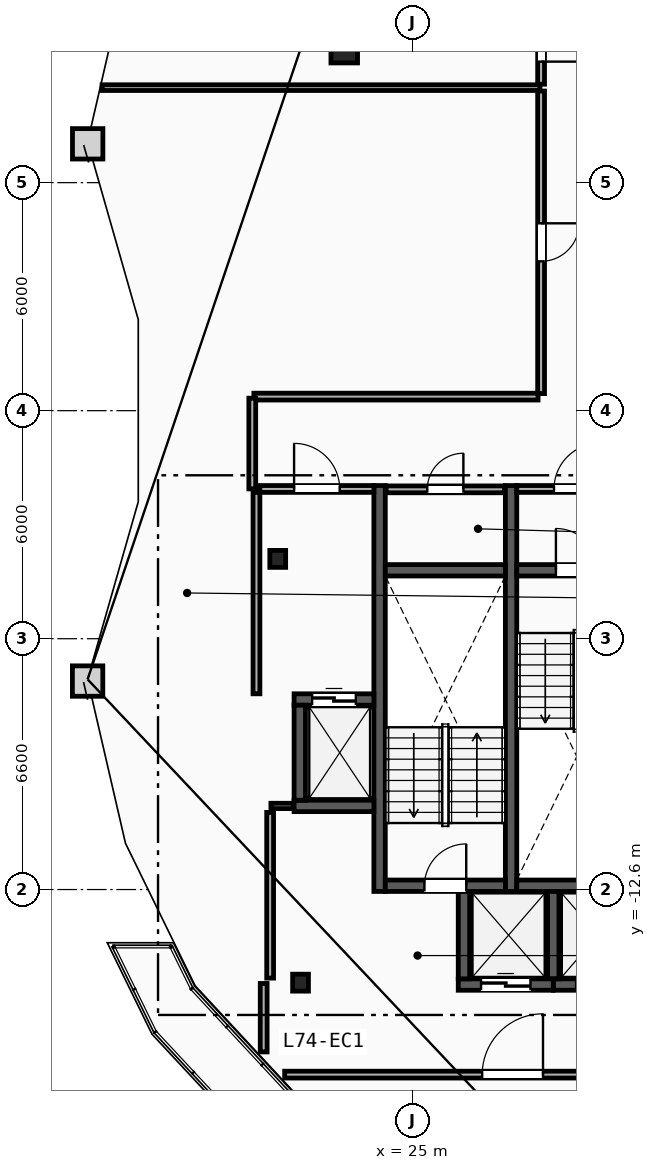
"""IFC4 building model, lengths in metres.
Left out: names, types, materials, properties, quantities, classifications, styles, units other than length and angle.
Written with IfcOpenShell. Run it as: python <this file> out.ifc"""

import sys

from ifc_helpers import new_model, si_unit, direction, frame, frame_2d, origin, origin_2d, place, context, subcontext, project, spatial, rectangle, i_section, extrude, element, fill, save


model = new_model("IFC4")
c1 = context("Model", 3, precision=1e-05, world=origin(), true_north=direction((0.0, 1.0)))
c2 = subcontext(c1, "Body", "Model", "MODEL_VIEW")
j1 = project(units=[si_unit("LENGTHUNIT", "METRE"), si_unit("PLANEANGLEUNIT", "RADIAN")], contexts=[c1])
p1 = place(None, origin())
s1 = spatial("IfcSite", under=j1, at=p1, CompositionType="ELEMENT")
p2 = place(p1, origin())
s2 = spatial("IfcBuilding", under=s1, at=p2, CompositionType="ELEMENT")
p3 = place(p2, frame((0.0, 0.0, 279.2)))
s3 = spatial("IfcBuildingStorey", under=s2, at=p3, CompositionType="ELEMENT", Elevation=279.2)
for number, where, z_axis, x_axis in (
    (1, (21.45, -3.9, 0.0), (0.0, 0.0, 1.0), (1.0, 0.0, 0.0)),
    (2, (22.05, -15.05, 0.0), (0.0, 0.0, 1.0), (1.0, 0.0, 0.0)),
):
    element("IfcColumn", number, at=place(p3, frame(where, z_axis=z_axis, x_axis=x_axis)), inside=s3, PredefinedType="COLUMN", context=c2, shape_type="SweptSolid", body=[
        extrude(i_section(OverallWidth=0.416, OverallDepth=0.446, WebThickness=0.039, FlangeThickness=0.063, FilletRadius=0.018, at=origin_2d()), origin(), (0.0, 0.0, 1.0), 3.6),
    ])
p4 = place(p3, frame((23.2, 9.5, 0.0), z_axis=(0.0, 0.0, 1.0), x_axis=(1.0, 0.0, 0.0)))
e3 = element("IfcColumn", 3, at=p4, inside=s3, PredefinedType="COLUMN", context=c2, shape_type="SweptSolid", body=[
    extrude(rectangle(XDim=0.7, YDim=0.7, at=origin_2d()), origin(), (0.0, 0.0, 1.0), 3.6),
])
for number, where, z_axis, x_axis in (
    (4, (27.59, -12.65, 0.0), (0.0, 0.0, 1.0), (0.0, 1.0, 0.0)),
    (5, (24.13, -12.65, 0.0), (0.0, 0.0, 1.0), (0.0, 1.0, 0.0)),
):
    element("IfcWall", number, at=place(p3, frame(where, z_axis=z_axis, x_axis=x_axis)), inside=s3, PredefinedType="SHEAR", context=c2, shape_type="SweptSolid", body=[
        extrude(rectangle(XDim=10.68, YDim=0.3, at=frame_2d((5.34, 0.0))), origin(), (0.0, 0.0, 1.0), 3.34),
    ])
p5 = place(p3, frame((27.74, -4.2, 0.0), z_axis=(0.0, 0.0, 1.0), x_axis=(1.0, 0.0, 0.0)))
e6 = element("IfcWall", 6, at=p5, inside=s3, PredefinedType="SHEAR", context=c2, shape_type="SweptSolid", body=[
    extrude(rectangle(XDim=3.16, YDim=0.3, at=frame_2d((1.58, 0.0))), origin(), (0.0, 0.0, 1.0), 3.34),
])
p6 = place(p5, frame((1.03, 0.0, 0.0)))
e7 = element("IfcOpeningElement", 7, at=p6, cuts=e6, PredefinedType="OPENING", context=c2, shape_type="SweptSolid", body=[
    extrude(rectangle(XDim=1.1, YDim=2.15, at=frame_2d((0.55, 1.075))), frame((0.0, 0.16, 0.0), z_axis=(0.0, -1.0, 0.0), x_axis=(1.0, 0.0, 0.0)), (0.0, 0.0, 1.0), 0.32),
])
p7 = place(p3, frame((27.74, -12.5, 0.0), z_axis=(0.0, 0.0, 1.0), x_axis=(1.0, 0.0, 0.0)))
e8 = element("IfcWall", 8, at=p7, inside=s3, PredefinedType="SHEAR", context=c2, shape_type="SweptSolid", body=[
    extrude(rectangle(XDim=3.16, YDim=0.3, at=frame_2d((1.58, 0.0))), origin(), (0.0, 0.0, 1.0), 3.34),
])
p8 = place(p3, frame((24.28, -12.5, 0.0), z_axis=(0.0, 0.0, 1.0), x_axis=(1.0, 0.0, 0.0)))
e9 = element("IfcWall", 9, at=p8, inside=s3, PredefinedType="SHEAR", context=c2, shape_type="SweptSolid", body=[
    extrude(rectangle(XDim=3.16, YDim=0.3, at=frame_2d((1.58, 0.0))), origin(), (0.0, 0.0, 1.0), 3.34),
])
p9 = place(p8, frame((1.03, 0.0, 0.0)))
e10 = element("IfcOpeningElement", 10, at=p9, cuts=e9, PredefinedType="OPENING", context=c2, shape_type="SweptSolid", body=[
    extrude(rectangle(XDim=1.1, YDim=2.15, at=frame_2d((0.55, 1.075))), frame((0.0, 0.16, 0.0), z_axis=(0.0, -1.0, 0.0), x_axis=(1.0, 0.0, 0.0)), (0.0, 0.0, 1.0), 0.32),
])
p10 = place(p3, frame((24.28, -4.2, 0.0), z_axis=(0.0, 0.0, 1.0), x_axis=(1.0, 0.0, 0.0)))
e11 = element("IfcWall", 11, at=p10, inside=s3, PredefinedType="SHEAR", context=c2, shape_type="SweptSolid", body=[
    extrude(rectangle(XDim=3.16, YDim=0.3, at=frame_2d((1.58, 0.0))), origin(), (0.0, 0.0, 1.0), 3.34),
])
p11 = place(p3, frame((20.89, -7.45, 0.0), z_axis=(0.0, 0.0, 1.0), x_axis=(0.0, 1.0, 0.0)))
e12 = element("IfcWall", 12, at=p11, inside=s3, PredefinedType="PARTITIONING", context=c2, shape_type="SweptSolid", body=[
    extrude(rectangle(XDim=5.3, YDim=0.18, at=frame_2d((2.65, 0.0))), origin(), (0.0, 0.0, 1.0), 3.34),
])
p12 = place(p3, frame((20.98, -2.06, 0.0), z_axis=(0.0, 0.0, 1.0), x_axis=(1.0, 0.0, 0.0)))
e13 = element("IfcWall", 13, at=p12, inside=s3, PredefinedType="PARTITIONING", context=c2, shape_type="SweptSolid", body=[
    extrude(rectangle(XDim=3.0, YDim=0.18, at=frame_2d((1.5, 0.0))), origin(), (0.0, 0.0, 1.0), 3.34),
])
p13 = place(p12, frame((0.9, 0.0, 0.0)))
e14 = element("IfcOpeningElement", 14, at=p13, cuts=e13, PredefinedType="OPENING", context=c2, shape_type="SweptSolid", body=[
    extrude(rectangle(XDim=1.2, YDim=2.15, at=frame_2d((0.6, 1.075))), frame((0.0, 0.1, 0.0), z_axis=(0.0, -1.0, 0.0), x_axis=(1.0, 0.0, 0.0)), (0.0, 0.0, 1.0), 0.2),
])
p14 = place(p3, frame((27.74, -2.06, 0.0), z_axis=(0.0, 0.0, 1.0), x_axis=(1.0, 0.0, 0.0)))
e15 = element("IfcWall", 15, at=p14, inside=s3, PredefinedType="PARTITIONING", context=c2, shape_type="SweptSolid", body=[
    extrude(rectangle(XDim=3.16, YDim=0.18, at=frame_2d((1.58, 0.0))), origin(), (0.0, 0.0, 1.0), 3.34),
])
p15 = place(p14, frame((0.98, 0.0, 0.0)))
e16 = element("IfcOpeningElement", 16, at=p15, cuts=e15, PredefinedType="OPENING", context=c2, shape_type="SweptSolid", body=[
    extrude(rectangle(XDim=1.2, YDim=2.15, at=frame_2d((0.6, 1.075))), frame((0.0, 0.1, 0.0), z_axis=(0.0, -1.0, 0.0), x_axis=(1.0, 0.0, 0.0)), (0.0, 0.0, 1.0), 0.2),
])
p16 = place(p3, frame((21.88, -7.6, 0.0), z_axis=(0.0, 0.0, 1.0), x_axis=(1.0, 0.0, 0.0)))
e17 = element("IfcWall", 17, at=p16, inside=s3, PredefinedType="SHEAR", context=c2, shape_type="SweptSolid", body=[
    extrude(rectangle(XDim=2.1, YDim=0.3, at=frame_2d((1.05, 0.0))), origin(), (0.0, 0.0, 1.0), 3.34),
])
p17 = place(p16, frame((0.475, 0.0, 0.0)))
e18 = element("IfcOpeningElement", 18, at=p17, cuts=e17, PredefinedType="OPENING", context=c2, shape_type="SweptSolid", body=[
    extrude(rectangle(XDim=1.15, YDim=2.2, at=frame_2d((0.575, 1.1))), frame((0.0, 0.16, 0.0), z_axis=(0.0, -1.0, 0.0), x_axis=(1.0, 0.0, 0.0)), (0.0, 0.0, 1.0), 0.32),
])
p18 = place(p3, frame((21.88, -10.4, 0.0), z_axis=(0.0, 0.0, 1.0), x_axis=(1.0, 0.0, 0.0)))
e19 = element("IfcWall", 19, at=p18, inside=s3, PredefinedType="SHEAR", context=c2, shape_type="SweptSolid", body=[
    extrude(rectangle(XDim=2.1, YDim=0.3, at=frame_2d((1.05, 0.0))), origin(), (0.0, 0.0, 1.0), 3.34),
])
p19 = place(p3, frame((22.03, -10.25, 0.0), z_axis=(0.0, 0.0, 1.0), x_axis=(0.0, 1.0, 0.0)))
e20 = element("IfcWall", 20, at=p19, inside=s3, PredefinedType="SHEAR", context=c2, shape_type="SweptSolid", body=[
    extrude(rectangle(XDim=2.5, YDim=0.3, at=frame_2d((1.25, 0.0))), origin(), (0.0, 0.0, 1.0), 3.34),
])
p20 = place(p3, frame((28.7, -15.1, 0.0), z_axis=(0.0, 0.0, 1.0), x_axis=(1.0, 0.0, 0.0)))
e21 = element("IfcWall", 21, at=p20, inside=s3, PredefinedType="SHEAR", context=c2, shape_type="SweptSolid", body=[
    extrude(rectangle(XDim=2.5, YDim=0.3, at=frame_2d((1.25, 0.0))), origin(), (0.0, 0.0, 1.0), 3.34),
])
p21 = place(p20, frame((0.6, 0.0, 0.0)))
e22 = element("IfcOpeningElement", 22, at=p21, cuts=e21, PredefinedType="OPENING", context=c2, shape_type="SweptSolid", body=[
    extrude(rectangle(XDim=1.3, YDim=2.2, at=frame_2d((0.65, 1.1))), frame((0.0, 0.16, 0.0), z_axis=(0.0, -1.0, 0.0), x_axis=(1.0, 0.0, 0.0)), (0.0, 0.0, 1.0), 0.32),
])
p22 = place(p3, frame((28.7, -14.95, 0.0), z_axis=(0.0, 0.0, 1.0), x_axis=(0.0, 1.0, 0.0)))
e23 = element("IfcWall", 23, at=p22, inside=s3, PredefinedType="SHEAR", context=c2, shape_type="SweptSolid", body=[
    extrude(rectangle(XDim=2.3, YDim=0.3, at=frame_2d((1.15, 0.0))), origin(), (0.0, 0.0, 1.0), 3.34),
])
p23 = place(p3, frame((26.2, -15.1, 0.0), z_axis=(0.0, 0.0, 1.0), x_axis=(1.0, 0.0, 0.0)))
e24 = element("IfcWall", 24, at=p23, inside=s3, PredefinedType="SHEAR", context=c2, shape_type="SweptSolid", body=[
    extrude(rectangle(XDim=2.5, YDim=0.3, at=frame_2d((1.25, 0.0))), origin(), (0.0, 0.0, 1.0), 3.34),
])
p24 = place(p23, frame((0.6, 0.0, 0.0)))
e25 = element("IfcOpeningElement", 25, at=p24, cuts=e24, PredefinedType="OPENING", context=c2, shape_type="SweptSolid", body=[
    extrude(rectangle(XDim=1.3, YDim=2.2, at=frame_2d((0.65, 1.1))), frame((0.0, 0.16, 0.0), z_axis=(0.0, -1.0, 0.0), x_axis=(1.0, 0.0, 0.0)), (0.0, 0.0, 1.0), 0.32),
])
p25 = place(p3, frame((26.35, -14.95, 0.0), z_axis=(0.0, 0.0, 1.0), x_axis=(0.0, 1.0, 0.0)))
e26 = element("IfcWall", 26, at=p25, inside=s3, PredefinedType="SHEAR", context=c2, shape_type="SweptSolid", body=[
    extrude(rectangle(XDim=2.3, YDim=0.3, at=frame_2d((1.15, 0.0))), origin(), (0.0, 0.0, 1.0), 3.34),
])
p26 = place(p3, frame((21.27, -10.4, 0.0), z_axis=(0.0, 0.0, 1.0), x_axis=(1.0, 0.0, 0.0)))
e27 = element("IfcWall", 27, at=p26, inside=s3, PredefinedType="PARTITIONING", context=c2, shape_type="SweptSolid", body=[
    extrude(rectangle(XDim=0.59, YDim=0.14, at=frame_2d((0.295, 0.0))), origin(), (0.0, 0.0, 1.0), 3.34),
])
p27 = place(p3, frame((21.25, -14.93, 0.0), z_axis=(0.0, 0.0, 1.0), x_axis=(0.0, 1.0, 0.0)))
e28 = element("IfcWall", 28, at=p27, inside=s3, PredefinedType="PARTITIONING", context=c2, shape_type="SweptSolid", body=[
    extrude(rectangle(XDim=4.36, YDim=0.18, at=frame_2d((2.18, 0.0))), origin(), (0.0, 0.0, 1.0), 3.34),
])
p28 = place(p3, frame((24.3, -2.07, 0.0), z_axis=(0.0, 0.0, 1.0), x_axis=(1.0, 0.0, 0.0)))
e29 = element("IfcWall", 29, at=p28, inside=s3, PredefinedType="PARTITIONING", context=c2, shape_type="SweptSolid", body=[
    extrude(rectangle(XDim=3.12, YDim=0.18, at=frame_2d((1.56, 0.0))), origin(), (0.0, 0.0, 1.0), 3.34),
])
p29 = place(p28, frame((1.085, 0.0, 0.0)))
e30 = element("IfcOpeningElement", 30, at=p29, cuts=e29, PredefinedType="OPENING", context=c2, shape_type="SweptSolid", body=[
    extrude(rectangle(XDim=0.95, YDim=2.1, at=frame_2d((0.475, 1.05))), frame((0.0, 0.1, 0.0), z_axis=(0.0, -1.0, 0.0), x_axis=(1.0, 0.0, 0.0)), (0.0, 0.0, 1.0), 0.2),
])
p30 = place(p3, frame((16.828, 8.5, 0.0), z_axis=(0.0, 0.0, 1.0), x_axis=(1.0, 0.0, 0.0)))
e31 = element("IfcWall", 31, at=p30, inside=s3, PredefinedType="PARTITIONING", context=c2, shape_type="SweptSolid", body=[
    extrude(rectangle(XDim=11.522, YDim=0.15, at=frame_2d((5.761, 0.0))), origin(), (0.0, 0.0, 1.0), 3.34),
])
p31 = place(p3, frame((21.632, -17.47, 0.0), z_axis=(0.0, 0.0, 1.0), x_axis=(1.0, 0.0, 0.0)))
e32 = element("IfcWall", 32, at=p31, inside=s3, PredefinedType="PARTITIONING", context=c2, shape_type="SweptSolid", body=[
    extrude(rectangle(XDim=11.996, YDim=0.18, at=frame_2d((5.998, 0.0))), origin(), (0.0, 0.0, 1.0), 3.34),
])
p32 = place(p31, frame((5.198, 0.0, 0.0)))
e33 = element("IfcOpeningElement", 33, at=p32, cuts=e32, PredefinedType="OPENING", context=c2, shape_type="SweptSolid", body=[
    extrude(rectangle(XDim=1.6, YDim=2.2, at=frame_2d((0.8, 1.1))), frame((0.0, 0.1, 0.0), z_axis=(0.0, -1.0, 0.0), x_axis=(1.0, 0.0, 0.0)), (0.0, 0.0, 1.0), 0.2),
])
p33 = place(p3, frame((28.38, 8.41, 0.0), z_axis=(0.0, 0.0, 1.0), x_axis=(0.0, -1.0, 0.0)))
e34 = element("IfcWall", 34, at=p33, inside=s3, PredefinedType="PARTITIONING", context=c2, shape_type="SweptSolid", body=[
    extrude(rectangle(XDim=7.96, YDim=0.18, at=frame_2d((3.98, 0.0))), origin(), (0.0, 0.0, 1.0), 3.34),
])
p34 = place(p33, frame((3.48, 0.0, 0.0)))
e35 = element("IfcOpeningElement", 35, at=p34, cuts=e34, PredefinedType="OPENING", context=c2, shape_type="SweptSolid", body=[
    extrude(rectangle(XDim=1.0, YDim=2.15, at=frame_2d((0.5, 1.075))), frame((0.0, 0.1, 0.0), z_axis=(0.0, -1.0, 0.0), x_axis=(1.0, 0.0, 0.0)), (0.0, 0.0, 1.0), 0.2),
])
p35 = place(p3, frame((28.3, 0.37, 0.0), z_axis=(0.0, 0.0, 1.0), x_axis=(-1.0, 0.0, 0.0)))
e36 = element("IfcWall", 36, at=p35, inside=s3, PredefinedType="PARTITIONING", context=c2, shape_type="SweptSolid", body=[
    extrude(rectangle(XDim=7.479, YDim=0.18, at=frame_2d((3.739, 0.0))), origin(), (0.0, 0.0, 1.0), 3.34),
])
p36 = place(p3, frame((20.78, 0.329, 0.0), z_axis=(0.0, 0.0, 1.0), x_axis=(0.0, -1.0, 0.0)))
e37 = element("IfcWall", 37, at=p36, inside=s3, PredefinedType="PARTITIONING", context=c2, shape_type="SweptSolid", body=[
    extrude(rectangle(XDim=2.387, YDim=0.18, at=frame_2d((1.194, 0.0))), origin(), (0.0, 0.0, 1.0), 3.34),
])
p37 = place(p3, frame((21.08, -15.072, 0.0), z_axis=(0.0, 0.0, 1.0), x_axis=(0.0, -1.0, 0.0)))
e38 = element("IfcWall", 38, at=p37, inside=s3, PredefinedType="PARTITIONING", context=c2, shape_type="SweptSolid", body=[
    extrude(rectangle(XDim=1.801, YDim=0.18, at=frame_2d((0.9, 0.0))), origin(), (0.0, 0.0, 1.0), 3.34),
])
p38 = place(p3, frame((28.38, 10.779, 0.0), z_axis=(0.0, 0.0, 1.0), x_axis=(0.0, -1.0, 0.0)))
e39 = element("IfcWall", 39, at=p38, inside=s3, PredefinedType="PARTITIONING", context=c2, shape_type="SweptSolid", body=[
    extrude(rectangle(XDim=2.188, YDim=0.18, at=frame_2d((1.094, 0.0))), origin(), (0.0, 0.0, 1.0), 3.34),
])
p39 = place(p38, frame((0.594, 0.0, 0.0)))
e40 = element("IfcOpeningElement", 40, at=p39, cuts=e39, PredefinedType="OPENING", context=c2, shape_type="SweptSolid", body=[
    extrude(rectangle(XDim=1.0, YDim=2.15, at=frame_2d((0.5, 1.075))), frame((0.0, 0.1, 0.0), z_axis=(0.0, -1.0, 0.0), x_axis=(1.0, 0.0, 0.0)), (0.0, 0.0, 1.0), 0.2),
])
p40 = place(p6, origin())
e41 = element("IfcDoor", 41, at=p40, inside=s3, OperationType="SINGLE_SWING_LEFT", PredefinedType="DOOR", context=c2, shape_type="SweptSolid", body=[
    extrude(rectangle(XDim=1.1, YDim=2.15, at=frame_2d((0.55, 1.075))), frame((0.0, 0.025, 0.0), z_axis=(0.0, -1.0, 0.0), x_axis=(1.0, 0.0, 0.0)), (0.0, 0.0, 1.0), 0.05),
])
fill(e7, e41)
p41 = place(p9, origin())
e42 = element("IfcDoor", 42, at=p41, inside=s3, OperationType="SINGLE_SWING_RIGHT", PredefinedType="DOOR", context=c2, shape_type="SweptSolid", body=[
    extrude(rectangle(XDim=1.1, YDim=2.15, at=frame_2d((0.55, 1.075))), frame((0.0, 0.025, 0.0), z_axis=(0.0, -1.0, 0.0), x_axis=(1.0, 0.0, 0.0)), (0.0, 0.0, 1.0), 0.05),
])
fill(e10, e42)
p42 = place(p13, origin())
e43 = element("IfcDoor", 43, at=p42, inside=s3, OperationType="SINGLE_SWING_LEFT", PredefinedType="DOOR", context=c2, shape_type="SweptSolid", body=[
    extrude(rectangle(XDim=1.2, YDim=2.15, at=frame_2d((0.6, 1.075))), frame((0.0, 0.025, 0.0), z_axis=(0.0, -1.0, 0.0), x_axis=(1.0, 0.0, 0.0)), (0.0, 0.0, 1.0), 0.05),
])
fill(e14, e43)
p43 = place(p15, origin())
e44 = element("IfcDoor", 44, at=p43, inside=s3, OperationType="SINGLE_SWING_RIGHT", PredefinedType="DOOR", context=c2, shape_type="SweptSolid", body=[
    extrude(rectangle(XDim=1.2, YDim=2.15, at=frame_2d((0.6, 1.075))), frame((0.0, 0.025, 0.0), z_axis=(0.0, -1.0, 0.0), x_axis=(1.0, 0.0, 0.0)), (0.0, 0.0, 1.0), 0.05),
])
fill(e16, e44)
p44 = place(p17, origin())
e45 = element("IfcDoor", 45, at=p44, inside=s3, OperationType="SLIDING_TO_LEFT", PredefinedType="TRAPDOOR", context=c2, shape_type="SweptSolid", body=[
    extrude(rectangle(XDim=1.15, YDim=2.2, at=frame_2d((0.575, 1.1))), frame((0.0, 0.025, 0.0), z_axis=(0.0, -1.0, 0.0), x_axis=(1.0, 0.0, 0.0)), (0.0, 0.0, 1.0), 0.05),
])
fill(e18, e45)
p45 = place(p21, origin())
e46 = element("IfcDoor", 46, at=p45, inside=s3, OperationType="SLIDING_TO_LEFT", PredefinedType="TRAPDOOR", context=c2, shape_type="SweptSolid", body=[
    extrude(rectangle(XDim=1.3, YDim=2.2, at=frame_2d((0.65, 1.1))), frame((0.0, 0.025, 0.0), z_axis=(0.0, -1.0, 0.0), x_axis=(1.0, 0.0, 0.0)), (0.0, 0.0, 1.0), 0.05),
])
fill(e22, e46)
p46 = place(p24, origin())
e47 = element("IfcDoor", 47, at=p46, inside=s3, OperationType="SLIDING_TO_LEFT", PredefinedType="TRAPDOOR", context=c2, shape_type="SweptSolid", body=[
    extrude(rectangle(XDim=1.3, YDim=2.2, at=frame_2d((0.65, 1.1))), frame((0.0, 0.025, 0.0), z_axis=(0.0, -1.0, 0.0), x_axis=(1.0, 0.0, 0.0)), (0.0, 0.0, 1.0), 0.05),
])
fill(e25, e47)
p47 = place(p32, origin())
e48 = element("IfcDoor", 48, at=p47, inside=s3, OperationType="SINGLE_SWING_RIGHT", PredefinedType="DOOR", context=c2, shape_type="SweptSolid", body=[
    extrude(rectangle(XDim=1.6, YDim=2.2, at=frame_2d((0.8, 1.1))), frame((0.0, 0.025, 0.0), z_axis=(0.0, -1.0, 0.0), x_axis=(1.0, 0.0, 0.0)), (0.0, 0.0, 1.0), 0.05),
])
fill(e33, e48)
p48 = place(p34, origin())
e49 = element("IfcDoor", 49, at=p48, inside=s3, OperationType="SINGLE_SWING_LEFT", PredefinedType="DOOR", context=c2, shape_type="SweptSolid", body=[
    extrude(rectangle(XDim=1.0, YDim=2.15, at=frame_2d((0.5, 1.075))), frame((0.0, 0.025, 0.0), z_axis=(0.0, -1.0, 0.0), x_axis=(1.0, 0.0, 0.0)), (0.0, 0.0, 1.0), 0.05),
])
fill(e35, e49)
p49 = place(p29, origin())
e50 = element("IfcDoor", 50, at=p49, inside=s3, OperationType="SINGLE_SWING_RIGHT", PredefinedType="DOOR", context=c2, shape_type="SweptSolid", body=[
    extrude(rectangle(XDim=0.95, YDim=2.1, at=frame_2d((0.475, 1.05))), frame((0.0, 0.025, 0.0), z_axis=(0.0, -1.0, 0.0), x_axis=(1.0, 0.0, 0.0)), (0.0, 0.0, 1.0), 0.05),
])
fill(e30, e50)
p50 = place(p39, origin())
e51 = element("IfcDoor", 51, at=p50, inside=s3, OperationType="SINGLE_SWING_RIGHT", PredefinedType="DOOR", context=c2, shape_type="SweptSolid", body=[
    extrude(rectangle(XDim=1.0, YDim=2.15, at=frame_2d((0.5, 1.075))), frame((0.0, 0.025, 0.0), z_axis=(0.0, -1.0, 0.0), x_axis=(1.0, 0.0, 0.0)), (0.0, 0.0, 1.0), 0.05),
])
fill(e40, e51)
save(model, sys.argv[1])
